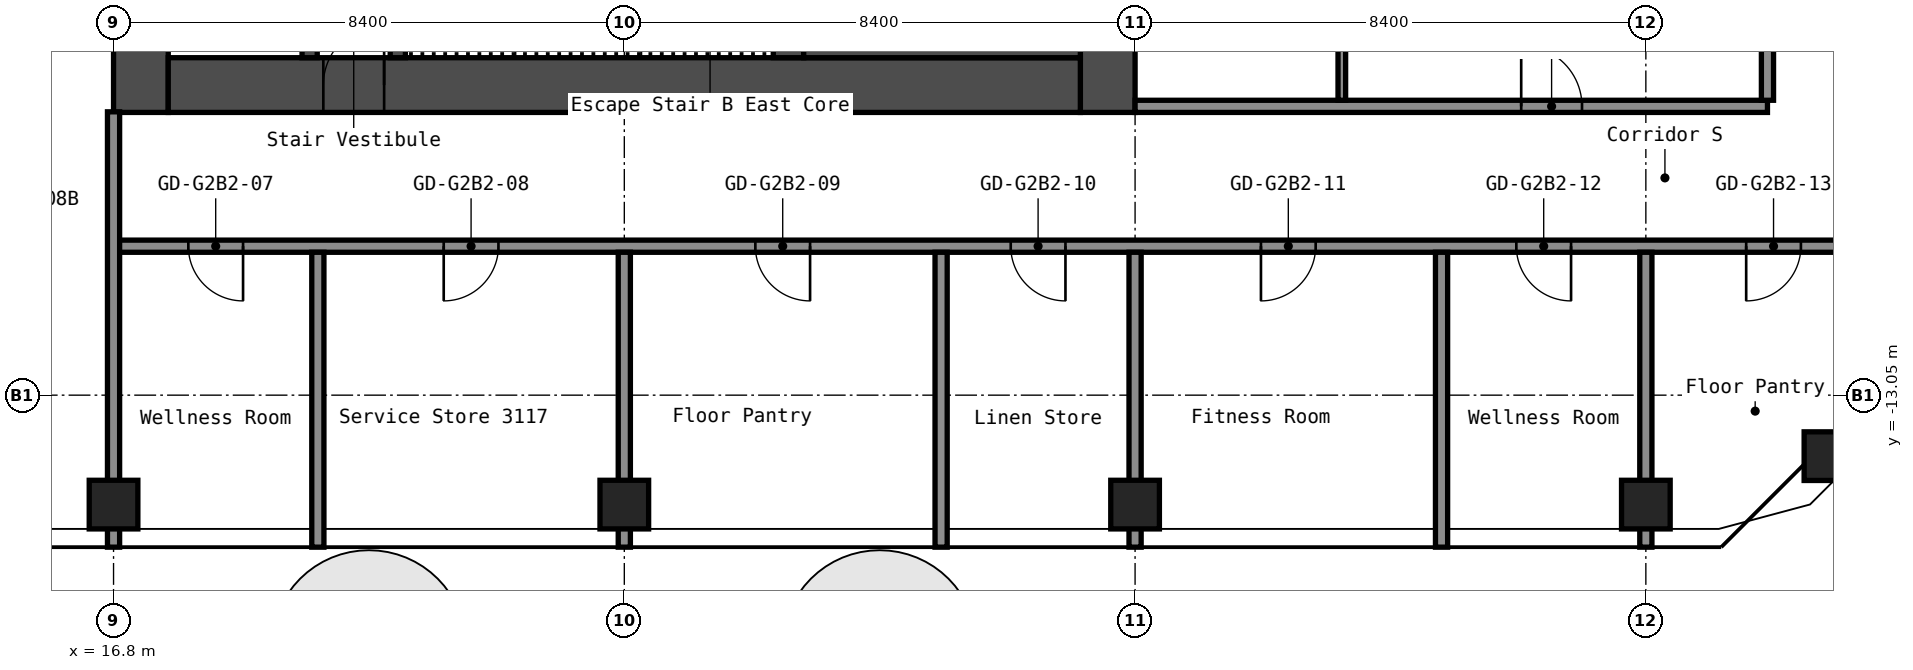
"""IFC4 building model, lengths in metres.
Left out: names, types, materials, properties, quantities, classifications, styles, units other than length and angle.
Written with IfcOpenShell. Run it as: python <this file> out.ifc"""

import sys

from ifc_helpers import new_model, si_unit, direction, frame, frame_2d, origin, origin_2d, place, context, subcontext, project, spatial, rectangle, hollow_rectangle, extrude, element, fill, save


model = new_model("IFC4")
c1 = context("Model", 3, precision=1e-05, world=origin(), true_north=direction((0.0, 1.0)))
c2 = subcontext(c1, "Body", "Model", "MODEL_VIEW")
j1 = project(units=[si_unit("LENGTHUNIT", "METRE"), si_unit("PLANEANGLEUNIT", "RADIAN")], contexts=[c1])
p1 = place(None, origin())
s1 = spatial("IfcSite", under=j1, at=p1, CompositionType="ELEMENT")
p2 = place(p1, origin())
s2 = spatial("IfcBuilding", under=s1, at=p2, CompositionType="ELEMENT")
p3 = place(p2, frame((0.0, 0.0, 110.6)))
s3 = spatial("IfcBuildingStorey", under=s2, at=p3, CompositionType="ELEMENT", Elevation=110.6)
for number, where, z_axis, x_axis in (
    (1, (16.8, -14.85, 0.0), (0.0, 0.0, 1.0), (1.0, 0.0, 0.0)),
    (2, (25.2, -14.85, 0.0), (0.0, 0.0, 1.0), (1.0, 0.0, 0.0)),
    (3, (33.6, -14.85, 0.0), (0.0, 0.0, 1.0), (1.0, 0.0, 0.0)),
    (4, (42.0, -14.85, 0.0), (0.0, 0.0, 1.0), (1.0, 0.0, 0.0)),
    (5, (45.003, -14.053, 0.0), (0.0, 0.0, 1.0), (1.0, 0.0, 0.0)),
):
    element("IfcColumn", number, at=place(p3, frame(where, z_axis=z_axis, x_axis=x_axis)), inside=s3, PredefinedType="COLUMN", context=c2, shape_type="SweptSolid", body=[
        extrude(hollow_rectangle(XDim=0.8, YDim=0.8, WallThickness=0.032, at=origin_2d()), origin(), (0.0, 0.0, 1.0), 2.8),
    ])
p4 = place(p3, frame((17.25, -8.4, 0.0), z_axis=(0.0, 0.0, 1.0), x_axis=(0.0, 1.0, 0.0)))
e6 = element("IfcWall", 6, at=p4, inside=s3, PredefinedType="SHEAR", context=c2, shape_type="SweptSolid", body=[
    extrude(rectangle(XDim=16.8, YDim=0.9, at=frame_2d((8.4, 0.0))), origin(), (0.0, 0.0, 1.0), 2.8),
])
p5 = place(p4, frame((7.6, 0.0, 0.0)))
e7 = element("IfcOpeningElement", 7, at=p5, cuts=e6, PredefinedType="OPENING", context=c2, shape_type="SweptSolid", body=[
    extrude(rectangle(XDim=1.2, YDim=2.1, at=frame_2d((0.6, 1.05))), frame((0.0, 0.46, 0.0), z_axis=(0.0, -1.0, 0.0), x_axis=(1.0, 0.0, 0.0)), (0.0, 0.0, 1.0), 0.92),
])
p6 = place(p3, frame((33.15, -8.4, 0.0), z_axis=(0.0, 0.0, 1.0), x_axis=(0.0, 1.0, 0.0)))
e8 = element("IfcWall", 8, at=p6, inside=s3, PredefinedType="SHEAR", context=c2, shape_type="SweptSolid", body=[
    extrude(rectangle(XDim=16.8, YDim=0.9, at=frame_2d((8.4, 0.0))), origin(), (0.0, 0.0, 1.0), 2.8),
])
p7 = place(p3, frame((17.7, -7.95, 0.0), z_axis=(0.0, 0.0, 1.0), x_axis=(1.0, 0.0, 0.0)))
e9 = element("IfcWall", 9, at=p7, inside=s3, PredefinedType="SHEAR", context=c2, shape_type="SweptSolid", body=[
    extrude(rectangle(XDim=15.0, YDim=0.9, at=frame_2d((7.5, 0.0))), origin(), (0.0, 0.0, 1.0), 2.8),
])
p8 = place(p7, frame((2.55, 0.0, 0.0)))
e10 = element("IfcOpeningElement", 10, at=p8, cuts=e9, PredefinedType="OPENING", context=c2, shape_type="SweptSolid", body=[
    extrude(rectangle(XDim=1.0, YDim=2.1, at=frame_2d((0.5, 1.05))), frame((0.0, 0.46, 0.0), z_axis=(0.0, -1.0, 0.0), x_axis=(1.0, 0.0, 0.0)), (0.0, 0.0, 1.0), 0.92),
])
p9 = place(p3, frame((20.025, -7.5, 0.0), z_axis=(0.0, 0.0, 1.0), x_axis=(0.0, 1.0, 0.0)))
e11 = element("IfcWall", 11, at=p9, inside=s3, PredefinedType="SHEAR", context=c2, shape_type="SweptSolid", body=[
    extrude(rectangle(XDim=6.3, YDim=0.25, at=frame_2d((3.15, 0.0))), origin(), (0.0, 0.0, 1.0), 2.8),
])
p10 = place(p9, frame((2.4, 0.0, 0.0)))
e12 = element("IfcOpeningElement", 12, at=p10, cuts=e11, PredefinedType="OPENING", context=c2, shape_type="SweptSolid", body=[
    extrude(rectangle(XDim=1.0, YDim=2.1, at=frame_2d((0.5, 1.05))), frame((0.0, 0.135, 0.0), z_axis=(0.0, -1.0, 0.0), x_axis=(1.0, 0.0, 0.0)), (0.0, 0.0, 1.0), 0.27),
])
p11 = place(p3, frame((21.475, -7.5, 0.0), z_axis=(0.0, 0.0, 1.0), x_axis=(0.0, 1.0, 0.0)))
e13 = element("IfcWall", 13, at=p11, inside=s3, PredefinedType="SHEAR", context=c2, shape_type="SweptSolid", body=[
    extrude(rectangle(XDim=3.75, YDim=0.25, at=frame_2d((1.875, 0.0))), origin(), (0.0, 0.0, 1.0), 2.8),
])
p12 = place(p11, frame((1.3, 0.0, 0.0)))
e14 = element("IfcOpeningElement", 14, at=p12, cuts=e13, PredefinedType="OPENING", context=c2, shape_type="SweptSolid", body=[
    extrude(rectangle(XDim=1.2, YDim=2.1, at=frame_2d((0.6, 1.05))), frame((0.0, 0.135, 0.0), z_axis=(0.0, -1.0, 0.0), x_axis=(1.0, 0.0, 0.0)), (0.0, 0.0, 1.0), 0.27),
])
p13 = place(p3, frame((27.9, -7.5, 0.0), z_axis=(0.0, 0.0, 1.0), x_axis=(0.0, 1.0, 0.0)))
e15 = element("IfcWall", 15, at=p13, inside=s3, PredefinedType="SHEAR", context=c2, shape_type="SweptSolid", body=[
    extrude(rectangle(XDim=3.75, YDim=0.5, at=frame_2d((1.875, 0.0))), origin(), (0.0, 0.0, 1.0), 2.8),
])
p14 = place(p3, frame((28.15, -6.75, 0.0), z_axis=(0.0, 0.0, 1.0), x_axis=(1.0, 0.0, 0.0)))
e16 = element("IfcWall", 16, at=p14, inside=s3, PredefinedType="SHEAR", context=c2, shape_type="SweptSolid", body=[
    extrude(rectangle(XDim=4.55, YDim=1.5, at=frame_2d((2.275, 0.0))), origin(), (0.0, 0.0, 1.0), 2.8),
])
p15 = place(p3, frame((16.8, -10.6, 0.0), z_axis=(0.0, 0.0, 1.0), x_axis=(1.0, 0.0, 0.0)))
e17 = element("IfcWall", 17, at=p15, inside=s3, PredefinedType="PARTITIONING", context=c2, shape_type="SweptSolid", body=[
    extrude(rectangle(XDim=29.7, YDim=0.2, at=frame_2d((14.85, 0.0))), origin(), (0.0, 0.0, 1.0), 2.8),
])
p16 = place(p15, frame((1.23, 0.0, 0.0)))
e18 = element("IfcOpeningElement", 18, at=p16, cuts=e17, PredefinedType="OPENING", context=c2, shape_type="SweptSolid", body=[
    extrude(rectangle(XDim=0.9, YDim=2.1, at=frame_2d((0.45, 1.05))), frame((0.0, 0.11, 0.0), z_axis=(0.0, -1.0, 0.0), x_axis=(1.0, 0.0, 0.0)), (0.0, 0.0, 1.0), 0.22),
])
p17 = place(p15, frame((5.43, 0.0, 0.0)))
e19 = element("IfcOpeningElement", 19, at=p17, cuts=e17, PredefinedType="OPENING", context=c2, shape_type="SweptSolid", body=[
    extrude(rectangle(XDim=0.9, YDim=2.1, at=frame_2d((0.45, 1.05))), frame((0.0, 0.11, 0.0), z_axis=(0.0, -1.0, 0.0), x_axis=(1.0, 0.0, 0.0)), (0.0, 0.0, 1.0), 0.22),
])
p18 = place(p15, frame((10.555, 0.0, 0.0)))
e20 = element("IfcOpeningElement", 20, at=p18, cuts=e17, PredefinedType="OPENING", context=c2, shape_type="SweptSolid", body=[
    extrude(rectangle(XDim=0.9, YDim=2.1, at=frame_2d((0.45, 1.05))), frame((0.0, 0.11, 0.0), z_axis=(0.0, -1.0, 0.0), x_axis=(1.0, 0.0, 0.0)), (0.0, 0.0, 1.0), 0.22),
])
p19 = place(p15, frame((14.755, 0.0, 0.0)))
e21 = element("IfcOpeningElement", 21, at=p19, cuts=e17, PredefinedType="OPENING", context=c2, shape_type="SweptSolid", body=[
    extrude(rectangle(XDim=0.9, YDim=2.1, at=frame_2d((0.45, 1.05))), frame((0.0, 0.11, 0.0), z_axis=(0.0, -1.0, 0.0), x_axis=(1.0, 0.0, 0.0)), (0.0, 0.0, 1.0), 0.22),
])
p20 = place(p15, frame((18.87, 0.0, 0.0)))
e22 = element("IfcOpeningElement", 22, at=p20, cuts=e17, PredefinedType="OPENING", context=c2, shape_type="SweptSolid", body=[
    extrude(rectangle(XDim=0.9, YDim=2.1, at=frame_2d((0.45, 1.05))), frame((0.0, 0.11, 0.0), z_axis=(0.0, -1.0, 0.0), x_axis=(1.0, 0.0, 0.0)), (0.0, 0.0, 1.0), 0.22),
])
p21 = place(p15, frame((23.07, 0.0, 0.0)))
e23 = element("IfcOpeningElement", 23, at=p21, cuts=e17, PredefinedType="OPENING", context=c2, shape_type="SweptSolid", body=[
    extrude(rectangle(XDim=0.9, YDim=2.1, at=frame_2d((0.45, 1.05))), frame((0.0, 0.11, 0.0), z_axis=(0.0, -1.0, 0.0), x_axis=(1.0, 0.0, 0.0)), (0.0, 0.0, 1.0), 0.22),
])
p22 = place(p15, frame((26.85, 0.0, 0.0)))
e24 = element("IfcOpeningElement", 24, at=p22, cuts=e17, PredefinedType="OPENING", context=c2, shape_type="SweptSolid", body=[
    extrude(rectangle(XDim=0.9, YDim=2.1, at=frame_2d((0.45, 1.05))), frame((0.0, 0.11, 0.0), z_axis=(0.0, -1.0, 0.0), x_axis=(1.0, 0.0, 0.0)), (0.0, 0.0, 1.0), 0.22),
])
p23 = place(p3, frame((33.6, -8.3, 0.0), z_axis=(0.0, 0.0, 1.0), x_axis=(1.0, 0.0, 0.0)))
e25 = element("IfcWall", 25, at=p23, inside=s3, PredefinedType="PARTITIONING", context=c2, shape_type="SweptSolid", body=[
    extrude(rectangle(XDim=10.4, YDim=0.2, at=frame_2d((5.2, 0.0))), origin(), (0.0, 0.0, 1.0), 2.8),
])
p24 = place(p23, frame((6.35, 0.0, 0.0)))
e26 = element("IfcOpeningElement", 26, at=p24, cuts=e25, PredefinedType="OPENING", context=c2, shape_type="SweptSolid", body=[
    extrude(rectangle(XDim=1.0, YDim=2.1, at=frame_2d((0.5, 1.05))), frame((0.0, 0.11, 0.0), z_axis=(0.0, -1.0, 0.0), x_axis=(1.0, 0.0, 0.0)), (0.0, 0.0, 1.0), 0.22),
])
p25 = place(p3, frame((16.8, -15.55, 0.0), z_axis=(0.0, 0.0, 1.0), x_axis=(0.0, 1.0, 0.0)))
e27 = element("IfcWall", 27, at=p25, inside=s3, PredefinedType="PARTITIONING", context=c2, shape_type="SweptSolid", body=[
    extrude(rectangle(XDim=7.16, YDim=0.2, at=frame_2d((3.58, 0.0))), origin(), (0.0, 0.0, 1.0), 2.8),
])
for number, where, z_axis, x_axis in (
    (28, (20.16, -15.55, 0.0), (0.0, 0.0, 1.0), (0.0, 1.0, 0.0)),
    (29, (25.2, -15.55, 0.0), (0.0, 0.0, 1.0), (0.0, 1.0, 0.0)),
    (30, (30.41, -15.55, 0.0), (0.0, 0.0, 1.0), (0.0, 1.0, 0.0)),
    (31, (33.6, -15.55, 0.0), (0.0, 0.0, 1.0), (0.0, 1.0, 0.0)),
):
    element("IfcWall", number, at=place(p3, frame(where, z_axis=z_axis, x_axis=x_axis)), inside=s3, PredefinedType="PARTITIONING", context=c2, shape_type="SweptSolid", body=[
        extrude(rectangle(XDim=4.85, YDim=0.2, at=frame_2d((2.425, 0.0))), origin(), (0.0, 0.0, 1.0), 2.8),
    ])
p26 = place(p3, frame((37.0, -8.2, 0.0), z_axis=(0.0, 0.0, 1.0), x_axis=(0.0, 1.0, 0.0)))
e32 = element("IfcWall", 32, at=p26, inside=s3, PredefinedType="PARTITIONING", context=c2, shape_type="SweptSolid", body=[
    extrude(rectangle(XDim=3.3, YDim=0.125, at=frame_2d((1.65, 0.0))), origin(), (0.0, 0.0, 1.0), 2.8),
])
for number, where, z_axis, x_axis in (
    (33, (38.64, -15.55, 0.0), (0.0, 0.0, 1.0), (0.0, 1.0, 0.0)),
    (34, (42.0, -15.55, 0.0), (0.0, 0.0, 1.0), (0.0, 1.0, 0.0)),
):
    element("IfcWall", number, at=place(p3, frame(where, z_axis=z_axis, x_axis=x_axis)), inside=s3, PredefinedType="PARTITIONING", context=c2, shape_type="SweptSolid", body=[
        extrude(rectangle(XDim=4.85, YDim=0.2, at=frame_2d((2.425, 0.0))), origin(), (0.0, 0.0, 1.0), 2.8),
    ])
p27 = place(p3, frame((44.0, -8.2, 0.0), z_axis=(0.0, 0.0, 1.0), x_axis=(0.0, 1.0, 0.0)))
e35 = element("IfcWall", 35, at=p27, inside=s3, PredefinedType="PARTITIONING", context=c2, shape_type="SweptSolid", body=[
    extrude(rectangle(XDim=16.4, YDim=0.2, at=frame_2d((8.2, 0.0))), origin(), (0.0, 0.0, 1.0), 2.8),
])
p28 = place(p8, origin())
e36 = element("IfcDoor", 36, at=p28, inside=s3, OperationType="SINGLE_SWING_LEFT", PredefinedType="DOOR", context=c2, shape_type="SweptSolid", body=[
    extrude(rectangle(XDim=1.0, YDim=2.1, at=frame_2d((0.5, 1.05))), frame((0.0, 0.025, 0.0), z_axis=(0.0, -1.0, 0.0), x_axis=(1.0, 0.0, 0.0)), (0.0, 0.0, 1.0), 0.05),
])
fill(e10, e36)
p29 = place(p16, origin())
e37 = element("IfcDoor", 37, at=p29, inside=s3, OperationType="SINGLE_SWING_RIGHT", PredefinedType="DOOR", context=c2, shape_type="SweptSolid", body=[
    extrude(rectangle(XDim=0.9, YDim=2.1, at=frame_2d((0.45, 1.05))), frame((0.0, 0.025, 0.0), z_axis=(0.0, -1.0, 0.0), x_axis=(1.0, 0.0, 0.0)), (0.0, 0.0, 1.0), 0.05),
])
fill(e18, e37)
p30 = place(p17, origin())
e38 = element("IfcDoor", 38, at=p30, inside=s3, OperationType="SINGLE_SWING_LEFT", PredefinedType="DOOR", context=c2, shape_type="SweptSolid", body=[
    extrude(rectangle(XDim=0.9, YDim=2.1, at=frame_2d((0.45, 1.05))), frame((0.0, 0.025, 0.0), z_axis=(0.0, -1.0, 0.0), x_axis=(1.0, 0.0, 0.0)), (0.0, 0.0, 1.0), 0.05),
])
fill(e19, e38)
p31 = place(p18, origin())
e39 = element("IfcDoor", 39, at=p31, inside=s3, OperationType="SINGLE_SWING_RIGHT", PredefinedType="DOOR", context=c2, shape_type="SweptSolid", body=[
    extrude(rectangle(XDim=0.9, YDim=2.1, at=frame_2d((0.45, 1.05))), frame((0.0, 0.025, 0.0), z_axis=(0.0, -1.0, 0.0), x_axis=(1.0, 0.0, 0.0)), (0.0, 0.0, 1.0), 0.05),
])
fill(e20, e39)
p32 = place(p19, origin())
e40 = element("IfcDoor", 40, at=p32, inside=s3, OperationType="SINGLE_SWING_RIGHT", PredefinedType="DOOR", context=c2, shape_type="SweptSolid", body=[
    extrude(rectangle(XDim=0.9, YDim=2.1, at=frame_2d((0.45, 1.05))), frame((0.0, 0.025, 0.0), z_axis=(0.0, -1.0, 0.0), x_axis=(1.0, 0.0, 0.0)), (0.0, 0.0, 1.0), 0.05),
])
fill(e21, e40)
p33 = place(p20, origin())
e41 = element("IfcDoor", 41, at=p33, inside=s3, OperationType="SINGLE_SWING_LEFT", PredefinedType="DOOR", context=c2, shape_type="SweptSolid", body=[
    extrude(rectangle(XDim=0.9, YDim=2.1, at=frame_2d((0.45, 1.05))), frame((0.0, 0.025, 0.0), z_axis=(0.0, -1.0, 0.0), x_axis=(1.0, 0.0, 0.0)), (0.0, 0.0, 1.0), 0.05),
])
fill(e22, e41)
p34 = place(p21, origin())
e42 = element("IfcDoor", 42, at=p34, inside=s3, OperationType="SINGLE_SWING_RIGHT", PredefinedType="DOOR", context=c2, shape_type="SweptSolid", body=[
    extrude(rectangle(XDim=0.9, YDim=2.1, at=frame_2d((0.45, 1.05))), frame((0.0, 0.025, 0.0), z_axis=(0.0, -1.0, 0.0), x_axis=(1.0, 0.0, 0.0)), (0.0, 0.0, 1.0), 0.05),
])
fill(e23, e42)
p35 = place(p22, origin())
e43 = element("IfcDoor", 43, at=p35, inside=s3, OperationType="SINGLE_SWING_LEFT", PredefinedType="DOOR", context=c2, shape_type="SweptSolid", body=[
    extrude(rectangle(XDim=0.9, YDim=2.1, at=frame_2d((0.45, 1.05))), frame((0.0, 0.025, 0.0), z_axis=(0.0, -1.0, 0.0), x_axis=(1.0, 0.0, 0.0)), (0.0, 0.0, 1.0), 0.05),
])
fill(e24, e43)
p36 = place(p24, origin())
e44 = element("IfcDoor", 44, at=p36, inside=s3, OperationType="SINGLE_SWING_RIGHT", PredefinedType="DOOR", context=c2, shape_type="SweptSolid", body=[
    extrude(rectangle(XDim=1.0, YDim=2.1, at=frame_2d((0.5, 1.05))), frame((0.0, 0.025, 0.0), z_axis=(0.0, -1.0, 0.0), x_axis=(1.0, 0.0, 0.0)), (0.0, 0.0, 1.0), 0.05),
])
fill(e26, e44)
save(model, sys.argv[1])
